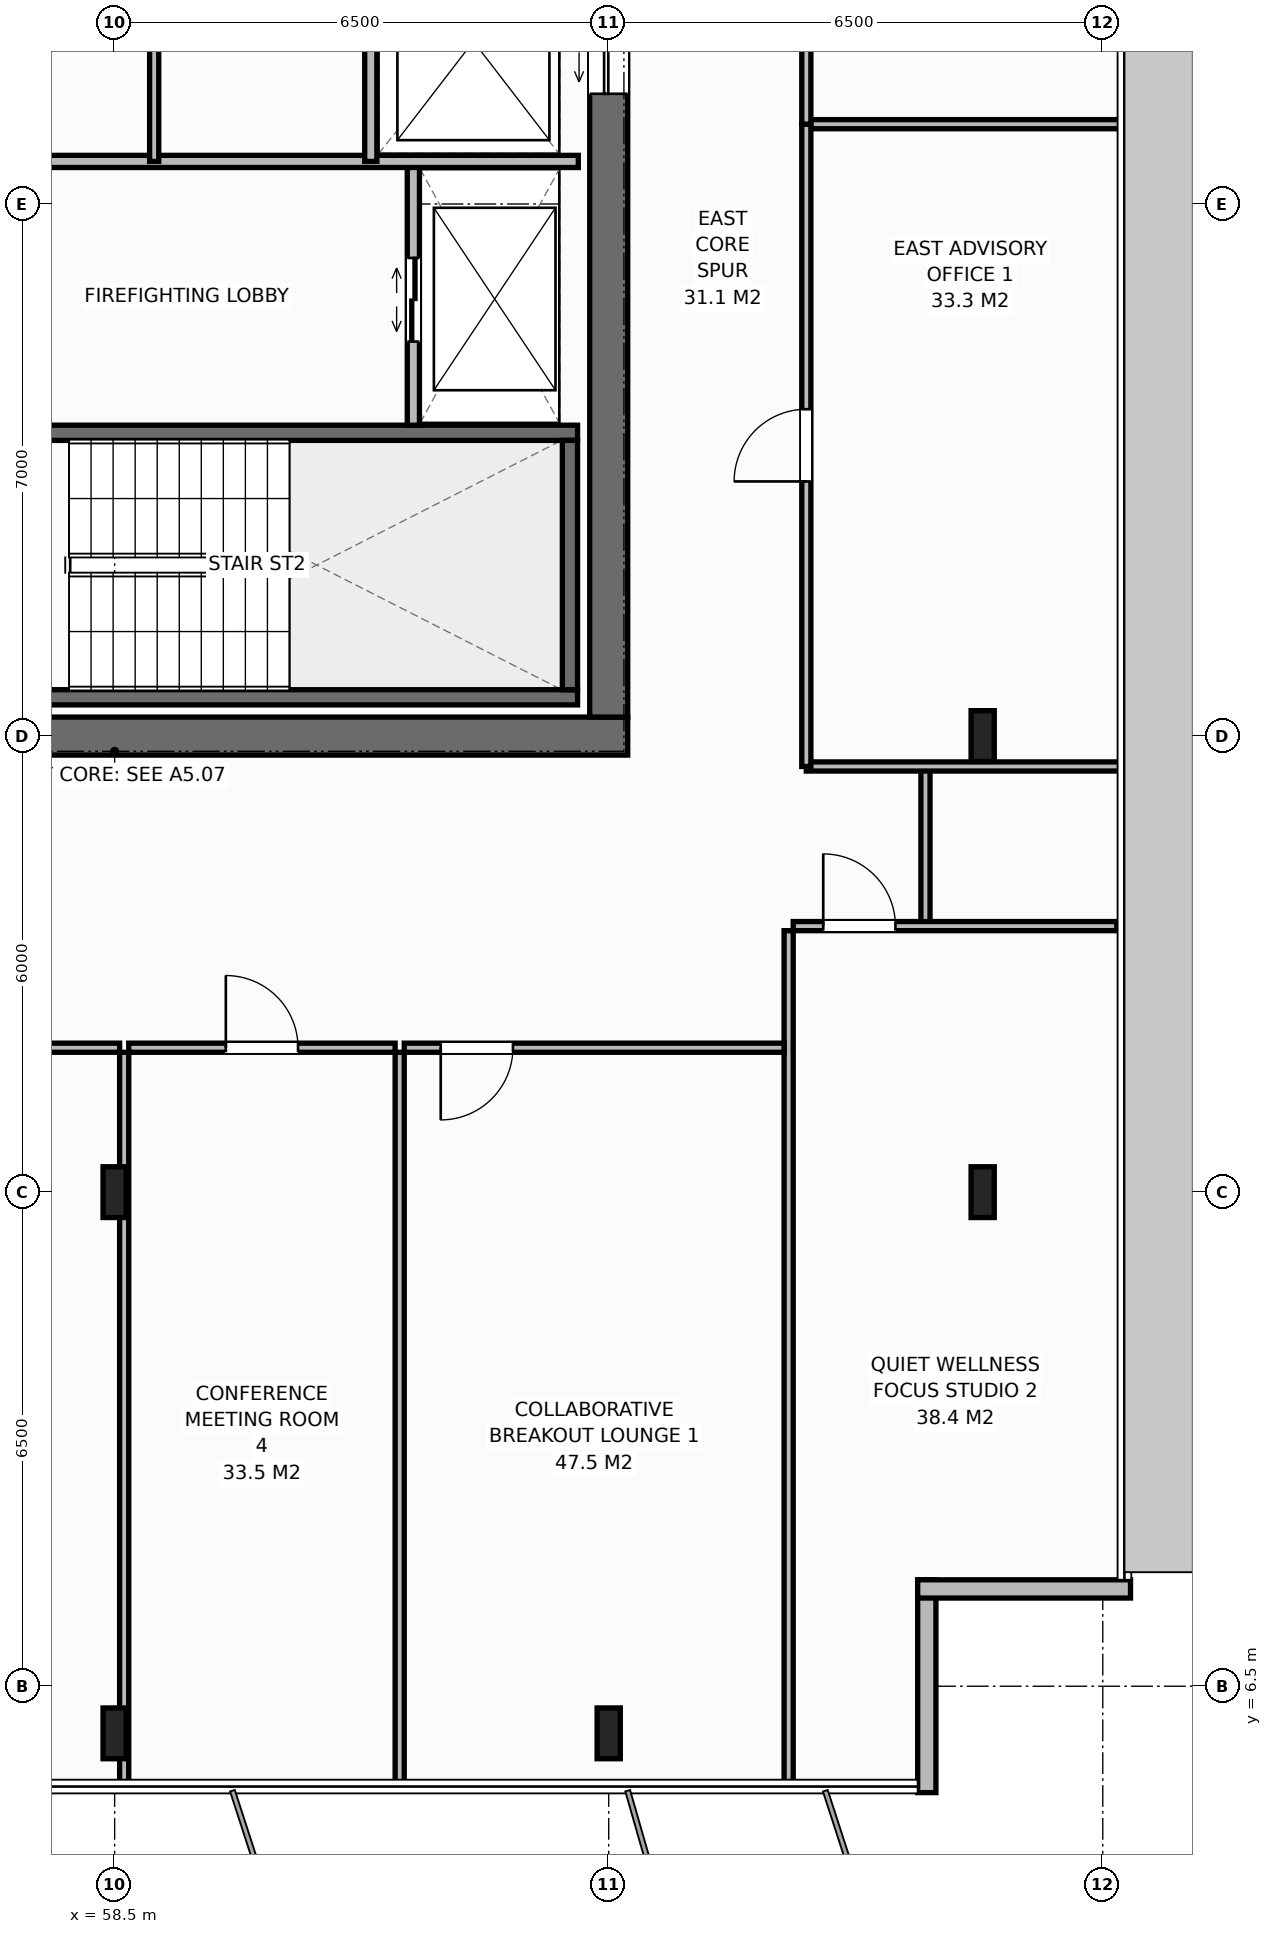
"""IFC4 building model, lengths in metres.
Left out: names, types, materials, properties, quantities, classifications, styles, units other than length and angle.
Written with IfcOpenShell. Run it as: python <this file> out.ifc"""

import sys

from ifc_helpers import new_model, si_unit, direction, frame, frame_2d, origin, origin_2d, place, context, subcontext, project, spatial, rectangle, i_section, extrude, element, fill, save


model = new_model("IFC4")
c1 = context("Model", 3, precision=1e-05, world=origin(), true_north=direction((0.0, 1.0)))
c2 = subcontext(c1, "Body", "Model", "MODEL_VIEW")
j1 = project(units=[si_unit("LENGTHUNIT", "METRE"), si_unit("PLANEANGLEUNIT", "RADIAN")], contexts=[c1])
p1 = place(None, origin())
s1 = spatial("IfcSite", under=j1, at=p1, CompositionType="ELEMENT")
p2 = place(p1, origin())
s2 = spatial("IfcBuilding", under=s1, at=p2, CompositionType="ELEMENT")
p3 = place(p2, frame((0.0, 0.0, 274.6)))
s3 = spatial("IfcBuildingStorey", under=s2, at=p3, CompositionType="ELEMENT", Elevation=274.6)
p4 = place(p3, frame((51.75, 19.0, 0.0), z_axis=(0.0, 0.0, 1.0), x_axis=(1.0, 0.0, 0.0)))
e1 = element("IfcWall", 1, at=p4, inside=s3, PredefinedType="SHEAR", context=c2, shape_type="SweptSolid", body=[
    extrude(rectangle(XDim=13.5, YDim=0.5, at=frame_2d((6.75, 0.0))), origin(), (0.0, 0.0, 1.0), 3.8),
])
p5 = place(p4, frame((2.97, 0.0, 0.0)))
e2 = element("IfcOpeningElement", 2, at=p5, cuts=e1, PredefinedType="OPENING", context=c2, shape_type="SweptSolid", body=[
    extrude(rectangle(XDim=1.4, YDim=2.2, at=frame_2d((0.7, 1.1))), frame((0.0, 0.26, 0.0), z_axis=(0.0, -1.0, 0.0), x_axis=(1.0, 0.0, 0.0)), (0.0, 0.0, 1.0), 0.52),
])
p6 = place(p3, frame((65.0, 19.25, 0.0), z_axis=(0.0, 0.0, 1.0), x_axis=(0.0, 1.0, 0.0)))
e3 = element("IfcWall", 3, at=p6, inside=s3, PredefinedType="SHEAR", context=c2, shape_type="SweptSolid", body=[
    extrude(rectangle(XDim=13.5, YDim=0.5, at=frame_2d((6.75, 0.0))), origin(), (0.0, 0.0, 1.0), 3.8),
])
p7 = place(p6, frame((8.2, 0.0, 0.0)))
e4 = element("IfcOpeningElement", 4, at=p7, cuts=e3, PredefinedType="OPENING", context=c2, shape_type="SweptSolid", body=[
    extrude(rectangle(XDim=1.3, YDim=2.2, at=frame_2d((0.65, 1.1))), frame((0.0, 0.26, 0.0), z_axis=(0.0, -1.0, 0.0), x_axis=(1.0, 0.0, 0.0)), (0.0, 0.0, 1.0), 0.52),
])
p8 = place(p3, frame((56.16, 19.51, 0.0), z_axis=(0.0, 0.0, 1.0), x_axis=(1.0, 0.0, 0.0)))
e5 = element("IfcWall", 5, at=p8, inside=s3, PredefinedType="SHEAR", context=c2, shape_type="SweptSolid", body=[
    extrude(rectangle(XDim=8.43, YDim=0.2, at=frame_2d((4.215, 0.0))), origin(), (0.0, 0.0, 1.0), 3.8),
])
p9 = place(p3, frame((56.16, 22.99, 0.0), z_axis=(0.0, 0.0, 1.0), x_axis=(1.0, 0.0, 0.0)))
e6 = element("IfcWall", 6, at=p9, inside=s3, PredefinedType="SHEAR", context=c2, shape_type="SweptSolid", body=[
    extrude(rectangle(XDim=8.43, YDim=0.2, at=frame_2d((4.215, 0.0))), origin(), (0.0, 0.0, 1.0), 3.8),
])
p10 = place(p9, frame((0.45, 0.0, 0.0)))
e7 = element("IfcOpeningElement", 7, at=p10, cuts=e6, PredefinedType="OPENING", context=c2, shape_type="SweptSolid", body=[
    extrude(rectangle(XDim=1.0, YDim=2.15, at=frame_2d((0.5, 1.075))), frame((0.0, 0.11, 0.0), z_axis=(0.0, -1.0, 0.0), x_axis=(1.0, 0.0, 0.0)), (0.0, 0.0, 1.0), 0.22),
])
p11 = place(p3, frame((64.49, 19.61, 0.0), z_axis=(0.0, 0.0, 1.0), x_axis=(0.0, 1.0, 0.0)))
e8 = element("IfcWall", 8, at=p11, inside=s3, PredefinedType="SHEAR", context=c2, shape_type="SweptSolid", body=[
    extrude(rectangle(XDim=3.28, YDim=0.2, at=frame_2d((1.64, 0.0))), origin(), (0.0, 0.0, 1.0), 3.8),
])
for number, where, z_axis, x_axis in (
    (9, (58.5, 13.0, 0.0), (0.0, 0.0, 1.0), (1.0, 0.0, 0.0)),
    (10, (58.5, 5.88, 0.0), (0.0, 0.0, 1.0), (1.0, 0.0, 0.0)),
    (11, (65.0, 5.88, 0.0), (0.0, 0.0, 1.0), (1.0, 0.0, 0.0)),
    (12, (69.92, 13.0, 0.0), (0.0, 0.0, 1.0), (1.0, 0.0, 0.0)),
    (13, (69.92, 19.0, 0.0), (0.0, 0.0, 1.0), (1.0, 0.0, 0.0)),
):
    element("IfcColumn", number, at=place(p3, frame(where, z_axis=z_axis, x_axis=x_axis)), inside=s3, PredefinedType="COLUMN", context=c2, shape_type="SweptSolid", body=[
        extrude(i_section(OverallWidth=0.305, OverallDepth=0.668, WebThickness=0.021, FlangeThickness=0.04, at=origin_2d()), origin(), (0.0, 0.0, 1.0), 3.8),
    ])
p12 = place(p3, frame((69.185, 7.9, 0.0), z_axis=(0.0, 0.0, 1.0), x_axis=(0.0, -1.0, 0.0)))
e14 = element("IfcWall", 14, at=p12, inside=s3, PredefinedType="STANDARD", context=c2, shape_type="SweptSolid", body=[
    extrude(rectangle(XDim=2.8, YDim=0.24, at=frame_2d((1.4, 0.0))), origin(), (0.0, 0.0, 1.0), 3.588),
])
p13 = place(p3, frame((71.865, 7.78, 0.0), z_axis=(0.0, 0.0, 1.0), x_axis=(-1.0, 0.0, 0.0)))
e15 = element("IfcWall", 15, at=p13, inside=s3, PredefinedType="STANDARD", context=c2, shape_type="SweptSolid", body=[
    extrude(rectangle(XDim=2.8, YDim=0.24, at=frame_2d((1.4, 0.0))), origin(), (0.0, 0.0, 1.0), 3.588),
])
p14 = place(p3, frame((62.43, 23.09, 0.0), z_axis=(0.0, 0.0, 1.0), x_axis=(0.0, 1.0, 0.0)))
e16 = element("IfcWall", 16, at=p14, inside=s3, PredefinedType="STANDARD", context=c2, shape_type="SweptSolid", body=[
    extrude(rectangle(XDim=3.47, YDim=0.16, at=frame_2d((1.735, 0.0))), origin(), (0.0, 0.0, 1.0), 3.588),
])
p15 = place(p14, frame((1.1, 0.0, 0.0)))
e17 = element("IfcOpeningElement", 17, at=p15, cuts=e16, PredefinedType="OPENING", context=c2, shape_type="SweptSolid", body=[
    extrude(rectangle(XDim=1.1, YDim=2.2, at=frame_2d((0.55, 1.1))), frame((0.0, 0.09, 0.0), z_axis=(0.0, -1.0, 0.0), x_axis=(1.0, 0.0, 0.0)), (0.0, 0.0, 1.0), 0.18),
])
p16 = place(p3, frame((56.26, 26.56, 0.0), z_axis=(0.0, 0.0, 1.0), x_axis=(1.0, 0.0, 0.0)))
e18 = element("IfcWall", 18, at=p16, inside=s3, PredefinedType="STANDARD", context=c2, shape_type="SweptSolid", body=[
    extrude(rectangle(XDim=8.34, YDim=0.16, at=frame_2d((4.17, 0.0))), origin(), (0.0, 0.0, 1.0), 3.588),
])
p17 = place(p3, frame((61.87, 26.56, 0.0), z_axis=(0.0, 0.0, 1.0), x_axis=(0.0, 1.0, 0.0)))
e19 = element("IfcWall", 19, at=p17, inside=s3, PredefinedType="STANDARD", context=c2, shape_type="SweptSolid", body=[
    extrude(rectangle(XDim=6.19, YDim=0.16, at=frame_2d((3.095, 0.0))), origin(), (0.0, 0.0, 1.0), 3.588),
])
p18 = place(p3, frame((59.02, 26.56, 0.0), z_axis=(0.0, 0.0, 1.0), x_axis=(0.0, 1.0, 0.0)))
e20 = element("IfcWall", 20, at=p18, inside=s3, PredefinedType="PARTITIONING", context=c2, shape_type="SweptSolid", body=[
    extrude(rectangle(XDim=6.19, YDim=0.12, at=frame_2d((3.095, 0.0))), origin(), (0.0, 0.0, 1.0), 3.588),
])
p19 = place(p3, frame((69.167, 16.5, 0.0), z_axis=(0.0, 0.0, 1.0), x_axis=(0.0, 1.0, 0.0)))
e21 = element("IfcWall", 21, at=p19, inside=s3, PredefinedType="PARTITIONING", context=c2, shape_type="SweptSolid", body=[
    extrude(rectangle(XDim=2.1, YDim=0.12, at=frame_2d((1.05, 0.0))), origin(), (0.0, 0.0, 1.0), 3.588),
])
p20 = place(p3, frame((58.625, 5.12, 0.0), z_axis=(0.0, 0.0, 1.0), x_axis=(0.0, 1.0, 0.0)))
e22 = element("IfcWall", 22, at=p20, inside=s3, PredefinedType="PARTITIONING", context=c2, shape_type="SweptSolid", body=[
    extrude(rectangle(XDim=9.72, YDim=0.12, at=frame_2d((4.86, 0.0))), origin(), (0.0, 0.0, 1.0), 2.788),
])
p21 = place(p3, frame((53.568, 14.9, 0.0), z_axis=(0.0, 0.0, 1.0), x_axis=(1.0, 0.0, 0.0)))
e23 = element("IfcWall", 23, at=p21, inside=s3, PredefinedType="PARTITIONING", context=c2, shape_type="SweptSolid", body=[
    extrude(rectangle(XDim=4.997, YDim=0.12, at=frame_2d((2.499, 0.0))), origin(), (0.0, 0.0, 1.0), 3.588),
])
p22 = place(p21, frame((2.024, 0.0, 0.0)))
e24 = element("IfcOpeningElement", 24, at=p22, cuts=e23, PredefinedType="OPENING", context=c2, shape_type="SweptSolid", body=[
    extrude(rectangle(XDim=0.95, YDim=2.15, at=frame_2d((0.475, 1.075))), frame((0.0, 0.07, 0.0), z_axis=(0.0, -1.0, 0.0), x_axis=(1.0, 0.0, 0.0)), (0.0, 0.0, 1.0), 0.14),
])
p23 = place(p3, frame((62.25, 5.12, 0.0), z_axis=(0.0, 0.0, 1.0), x_axis=(0.0, 1.0, 0.0)))
e25 = element("IfcWall", 25, at=p23, inside=s3, PredefinedType="PARTITIONING", context=c2, shape_type="SweptSolid", body=[
    extrude(rectangle(XDim=9.72, YDim=0.12, at=frame_2d((4.86, 0.0))), origin(), (0.0, 0.0, 1.0), 3.588),
])
p24 = place(p3, frame((58.686, 14.9, 0.0), z_axis=(0.0, 0.0, 1.0), x_axis=(1.0, 0.0, 0.0)))
e26 = element("IfcWall", 26, at=p24, inside=s3, PredefinedType="PARTITIONING", context=c2, shape_type="SweptSolid", body=[
    extrude(rectangle(XDim=3.505, YDim=0.12, at=frame_2d((1.752, 0.0))), origin(), (0.0, 0.0, 1.0), 3.588),
])
p25 = place(p24, frame((1.277, 0.0, 0.0)))
e27 = element("IfcOpeningElement", 27, at=p25, cuts=e26, PredefinedType="OPENING", context=c2, shape_type="SweptSolid", body=[
    extrude(rectangle(XDim=0.95, YDim=2.15, at=frame_2d((0.475, 1.075))), frame((0.0, 0.07, 0.0), z_axis=(0.0, -1.0, 0.0), x_axis=(1.0, 0.0, 0.0)), (0.0, 0.0, 1.0), 0.14),
])
p26 = place(p3, frame((67.367, 5.12, 0.0), z_axis=(0.0, 0.0, 1.0), x_axis=(0.0, 1.0, 0.0)))
e28 = element("IfcWall", 28, at=p26, inside=s3, PredefinedType="PARTITIONING", context=c2, shape_type="SweptSolid", body=[
    extrude(rectangle(XDim=11.32, YDim=0.12, at=frame_2d((5.66, 0.0))), origin(), (0.0, 0.0, 1.0), 3.588),
])
p27 = place(p3, frame((62.31, 14.9, 0.0), z_axis=(0.0, 0.0, 1.0), x_axis=(1.0, 0.0, 0.0)))
e29 = element("IfcWall", 29, at=p27, inside=s3, PredefinedType="PARTITIONING", context=c2, shape_type="SweptSolid", body=[
    extrude(rectangle(XDim=4.997, YDim=0.12, at=frame_2d((2.499, 0.0))), origin(), (0.0, 0.0, 1.0), 3.588),
])
p28 = place(p27, frame((0.48, 0.0, 0.0)))
e30 = element("IfcOpeningElement", 30, at=p28, cuts=e29, PredefinedType="OPENING", context=c2, shape_type="SweptSolid", body=[
    extrude(rectangle(XDim=0.95, YDim=2.15, at=frame_2d((0.475, 1.075))), frame((0.0, 0.07, 0.0), z_axis=(0.0, -1.0, 0.0), x_axis=(1.0, 0.0, 0.0)), (0.0, 0.0, 1.0), 0.14),
])
p29 = place(p3, frame((67.427, 16.5, 0.0), z_axis=(0.0, 0.0, 1.0), x_axis=(1.0, 0.0, 0.0)))
e31 = element("IfcWall", 31, at=p29, inside=s3, PredefinedType="PARTITIONING", context=c2, shape_type="SweptSolid", body=[
    extrude(rectangle(XDim=4.258, YDim=0.12, at=frame_2d((2.129, 0.0))), origin(), (0.0, 0.0, 1.0), 3.588),
])
p30 = place(p29, frame((0.395, 0.0, 0.0)))
e32 = element("IfcOpeningElement", 32, at=p30, cuts=e31, PredefinedType="OPENING", context=c2, shape_type="SweptSolid", body=[
    extrude(rectangle(XDim=0.95, YDim=2.15, at=frame_2d((0.475, 1.075))), frame((0.0, 0.07, 0.0), z_axis=(0.0, -1.0, 0.0), x_axis=(1.0, 0.0, 0.0)), (0.0, 0.0, 1.0), 0.14),
])
for number, where, z_axis, x_axis in (
    (33, (67.6, 18.6, 0.0), (0.0, 0.0, 1.0), (1.0, 0.0, 0.0)),
    (34, (67.6, 27.05, 0.0), (0.0, 0.0, 1.0), (1.0, 0.0, 0.0)),
):
    element("IfcWall", number, at=place(p3, frame(where, z_axis=z_axis, x_axis=x_axis)), inside=s3, PredefinedType="PARTITIONING", context=c2, shape_type="SweptSolid", body=[
        extrude(rectangle(XDim=4.245, YDim=0.12, at=frame_2d((2.123, 0.0))), origin(), (0.0, 0.0, 1.0), 3.588),
    ])
p31 = place(p3, frame((67.6, 18.6, 0.0), z_axis=(0.0, 0.0, 1.0), x_axis=(0.0, 1.0, 0.0)))
e35 = element("IfcWall", 35, at=p31, inside=s3, PredefinedType="PARTITIONING", context=c2, shape_type="SweptSolid", body=[
    extrude(rectangle(XDim=8.45, YDim=0.12, at=frame_2d((4.225, 0.0))), origin(), (0.0, 0.0, 1.0), 3.588),
])
p32 = place(p31, frame((3.75, 0.0, 0.0)))
e36 = element("IfcOpeningElement", 36, at=p32, cuts=e35, PredefinedType="OPENING", context=c2, shape_type="SweptSolid", body=[
    extrude(rectangle(XDim=0.95, YDim=2.15, at=frame_2d((0.475, 1.075))), frame((0.0, 0.07, 0.0), z_axis=(0.0, -1.0, 0.0), x_axis=(1.0, 0.0, 0.0)), (0.0, 0.0, 1.0), 0.14),
])
p33 = place(p3, frame((67.6, 27.05, 0.0), z_axis=(0.0, 0.0, 1.0), x_axis=(0.0, 1.0, 0.0)))
e37 = element("IfcWall", 37, at=p33, inside=s3, PredefinedType="PARTITIONING", context=c2, shape_type="SweptSolid", body=[
    extrude(rectangle(XDim=8.45, YDim=0.12, at=frame_2d((4.225, 0.0))), origin(), (0.0, 0.0, 1.0), 3.588),
])
p34 = place(p33, frame((2.7, 0.0, 0.0)))
e38 = element("IfcOpeningElement", 38, at=p34, cuts=e37, PredefinedType="OPENING", context=c2, shape_type="SweptSolid", body=[
    extrude(rectangle(XDim=0.95, YDim=2.15, at=frame_2d((0.475, 1.075))), frame((0.0, 0.07, 0.0), z_axis=(0.0, -1.0, 0.0), x_axis=(1.0, 0.0, 0.0)), (0.0, 0.0, 1.0), 0.14),
])
p35 = place(p15, origin())
e39 = element("IfcDoor", 39, at=p35, inside=s3, OperationType="DOUBLE_DOOR_SLIDING", PredefinedType="DOOR", context=c2, shape_type="SweptSolid", body=[
    extrude(rectangle(XDim=1.1, YDim=2.2, at=frame_2d((0.55, 1.1))), frame((0.0, 0.025, 0.0), z_axis=(0.0, -1.0, 0.0), x_axis=(1.0, 0.0, 0.0)), (0.0, 0.0, 1.0), 0.05),
])
fill(e17, e39)
p36 = place(p7, origin())
e40 = element("IfcDoor", 40, at=p36, inside=s3, OperationType="DOUBLE_DOOR_SLIDING", PredefinedType="DOOR", context=c2, shape_type="SweptSolid", body=[
    extrude(rectangle(XDim=1.3, YDim=2.2, at=frame_2d((0.65, 1.1))), frame((0.0, 0.025, 0.0), z_axis=(0.0, -1.0, 0.0), x_axis=(1.0, 0.0, 0.0)), (0.0, 0.0, 1.0), 0.05),
])
fill(e4, e40)
p37 = place(p25, origin())
e41 = element("IfcDoor", 41, at=p37, inside=s3, OperationType="SINGLE_SWING_LEFT", PredefinedType="DOOR", context=c2, shape_type="SweptSolid", body=[
    extrude(rectangle(XDim=0.95, YDim=2.15, at=frame_2d((0.475, 1.075))), frame((0.0, 0.025, 0.0), z_axis=(0.0, -1.0, 0.0), x_axis=(1.0, 0.0, 0.0)), (0.0, 0.0, 1.0), 0.05),
])
fill(e27, e41)
p38 = place(p28, origin())
e42 = element("IfcDoor", 42, at=p38, inside=s3, OperationType="SINGLE_SWING_RIGHT", PredefinedType="DOOR", context=c2, shape_type="SweptSolid", body=[
    extrude(rectangle(XDim=0.95, YDim=2.15, at=frame_2d((0.475, 1.075))), frame((0.0, 0.025, 0.0), z_axis=(0.0, -1.0, 0.0), x_axis=(1.0, 0.0, 0.0)), (0.0, 0.0, 1.0), 0.05),
])
fill(e30, e42)
p39 = place(p30, origin())
e43 = element("IfcDoor", 43, at=p39, inside=s3, OperationType="SINGLE_SWING_LEFT", PredefinedType="DOOR", context=c2, shape_type="SweptSolid", body=[
    extrude(rectangle(XDim=0.95, YDim=2.15, at=frame_2d((0.475, 1.075))), frame((0.0, 0.025, 0.0), z_axis=(0.0, -1.0, 0.0), x_axis=(1.0, 0.0, 0.0)), (0.0, 0.0, 1.0), 0.05),
])
fill(e32, e43)
p40 = place(p32, origin())
e44 = element("IfcDoor", 44, at=p40, inside=s3, OperationType="SINGLE_SWING_LEFT", PredefinedType="DOOR", context=c2, shape_type="SweptSolid", body=[
    extrude(rectangle(XDim=0.95, YDim=2.15, at=frame_2d((0.475, 1.075))), frame((0.0, 0.025, 0.0), z_axis=(0.0, -1.0, 0.0), x_axis=(1.0, 0.0, 0.0)), (0.0, 0.0, 1.0), 0.05),
])
fill(e36, e44)
save(model, sys.argv[1])
